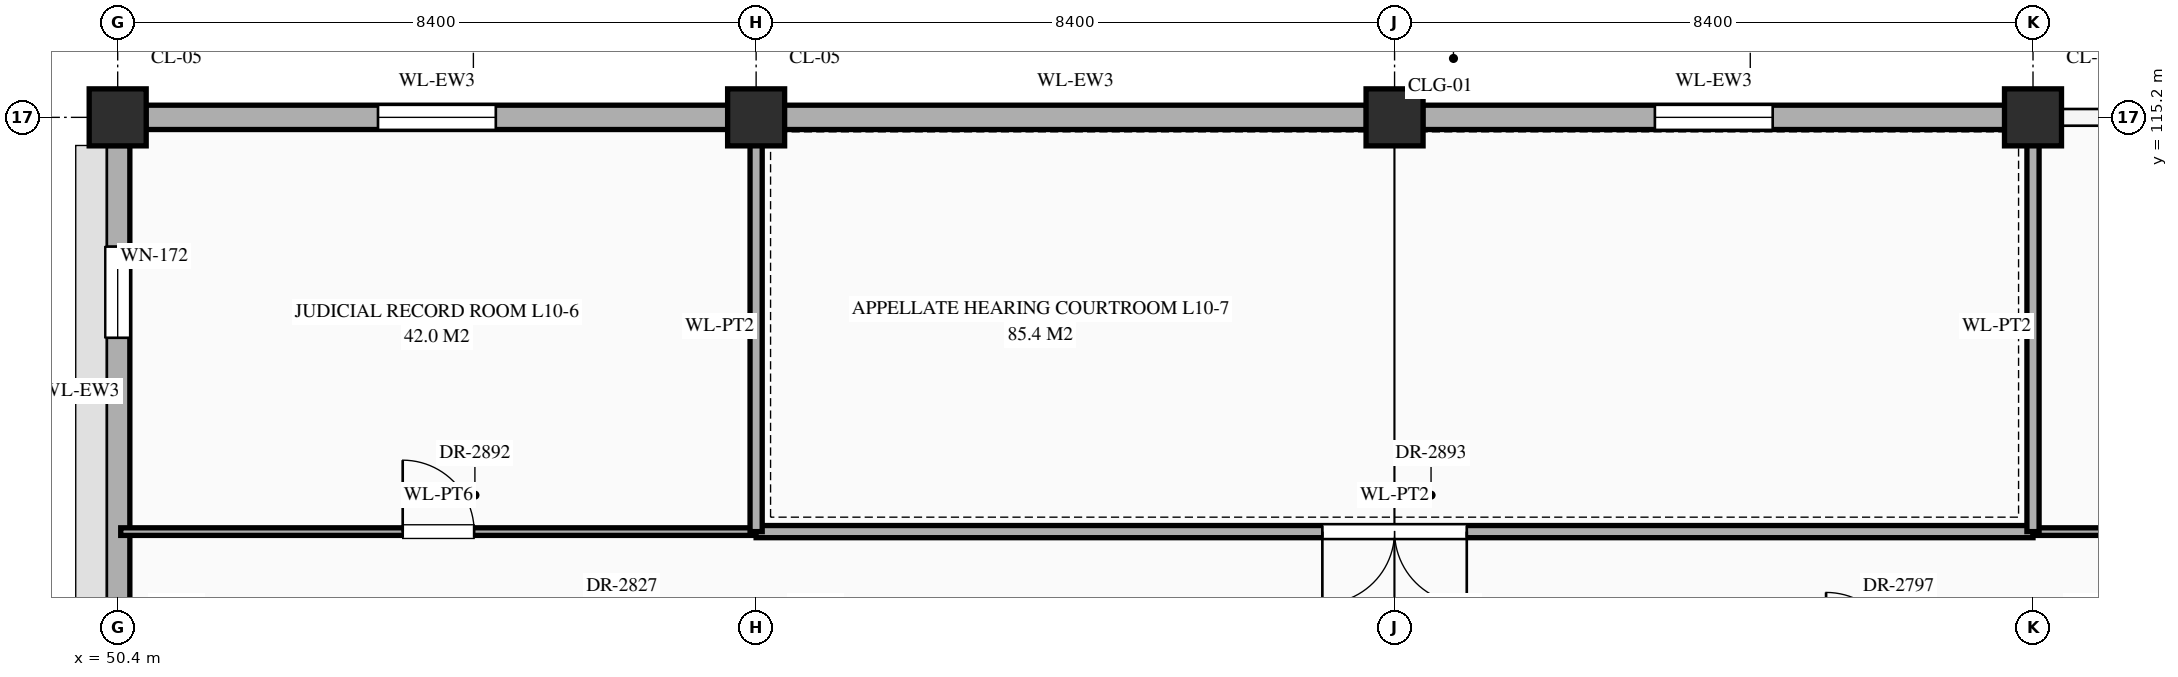
"""IFC4 building model, lengths in metres.
Left out: names, types, materials, properties, quantities, classifications, styles, units other than length and angle.
Written with IfcOpenShell. Run it as: python <this file> out.ifc"""

import sys

from ifc_helpers import new_model, si_unit, direction, frame, frame_2d, origin, origin_2d, place, context, subcontext, project, spatial, rectangle, extrude, element, fill, save


model = new_model("IFC4")
c1 = context("Model", 3, precision=1e-05, world=origin(), true_north=direction((0.0, 1.0)))
c2 = subcontext(c1, "Body", "Model", "MODEL_VIEW")
j1 = project(units=[si_unit("LENGTHUNIT", "METRE"), si_unit("PLANEANGLEUNIT", "RADIAN")], contexts=[c1])
p1 = place(None, origin())
s1 = spatial("IfcSite", under=j1, at=p1, CompositionType="ELEMENT")
p2 = place(p1, origin())
s2 = spatial("IfcBuilding", under=s1, at=p2, CompositionType="ELEMENT")
p3 = place(p2, frame((0.0, 0.0, 43.5)))
s3 = spatial("IfcBuildingStorey", under=s2, at=p3, CompositionType="ELEMENT", Elevation=43.5)
for number, where, z_axis, x_axis in (
    (1, (50.4, 115.2, 0.0), (0.0, 0.0, 1.0), (1.0, 0.0, 0.0)),
    (2, (58.8, 115.2, 0.0), (0.0, 0.0, 1.0), (1.0, 0.0, 0.0)),
    (3, (67.2, 115.2, 0.0), (0.0, 0.0, 1.0), (1.0, 0.0, 0.0)),
    (4, (75.6, 115.2, 0.0), (0.0, 0.0, 1.0), (1.0, 0.0, 0.0)),
):
    element("IfcColumn", number, at=place(p3, frame(where, z_axis=z_axis, x_axis=x_axis)), inside=s3, PredefinedType="COLUMN", context=c2, shape_type="SweptSolid", body=[
        extrude(rectangle(XDim=0.75, YDim=0.75, at=origin_2d()), origin(), (0.0, 0.0, 1.0), 4.2),
    ])
p4 = place(p3, frame((50.77, 115.2, 0.0), z_axis=(0.0, 0.0, 1.0), x_axis=(1.0, 0.0, 0.0)))
e5 = element("IfcWall", 5, at=p4, inside=s3, PredefinedType="STANDARD", context=c2, shape_type="SweptSolid", body=[
    extrude(rectangle(XDim=7.66, YDim=0.32, at=frame_2d((3.83, 0.0))), origin(), (0.0, 0.0, 1.0), 3.35),
])
p5 = place(p4, frame((3.055, 0.0, 0.85)))
e6 = element("IfcOpeningElement", 6, at=p5, cuts=e5, PredefinedType="OPENING", context=c2, shape_type="SweptSolid", body=[
    extrude(rectangle(XDim=1.55, YDim=1.74, at=frame_2d((0.775, 0.87))), frame((0.0, 0.172, 0.0), z_axis=(0.0, -1.0, 0.0), x_axis=(1.0, 0.0, 0.0)), (0.0, 0.0, 1.0), 0.344),
])
p6 = place(p3, frame((50.4, 108.37, 0.0), z_axis=(0.0, 0.0, 1.0), x_axis=(0.0, 1.0, 0.0)))
e7 = element("IfcWall", 7, at=p6, inside=s3, PredefinedType="STANDARD", context=c2, shape_type="SweptSolid", body=[
    extrude(rectangle(XDim=6.46, YDim=0.32, at=frame_2d((3.23, 0.0))), origin(), (0.0, 0.0, 1.0), 3.35),
])
p7 = place(p6, frame((3.93, 0.0, 0.85)))
e8 = element("IfcOpeningElement", 8, at=p7, cuts=e7, PredefinedType="OPENING", context=c2, shape_type="SweptSolid", body=[
    extrude(rectangle(XDim=1.2, YDim=1.74, at=frame_2d((0.6, 0.87))), frame((0.0, 0.172, 0.0), z_axis=(0.0, -1.0, 0.0), x_axis=(1.0, 0.0, 0.0)), (0.0, 0.0, 1.0), 0.344),
])
p8 = place(p3, frame((59.17, 115.2, 0.0), z_axis=(0.0, 0.0, 1.0), x_axis=(1.0, 0.0, 0.0)))
e9 = element("IfcWall", 9, at=p8, inside=s3, PredefinedType="STANDARD", context=c2, shape_type="SweptSolid", body=[
    extrude(rectangle(XDim=7.66, YDim=0.32, at=frame_2d((3.83, 0.0))), origin(), (0.0, 0.0, 1.0), 3.35),
])
p9 = place(p3, frame((67.57, 115.2, 0.0), z_axis=(0.0, 0.0, 1.0), x_axis=(1.0, 0.0, 0.0)))
e10 = element("IfcWall", 10, at=p9, inside=s3, PredefinedType="STANDARD", context=c2, shape_type="SweptSolid", body=[
    extrude(rectangle(XDim=7.66, YDim=0.32, at=frame_2d((3.83, 0.0))), origin(), (0.0, 0.0, 1.0), 3.35),
])
p10 = place(p9, frame((3.055, 0.0, 0.85)))
e11 = element("IfcOpeningElement", 11, at=p10, cuts=e10, PredefinedType="OPENING", context=c2, shape_type="SweptSolid", body=[
    extrude(rectangle(XDim=1.55, YDim=2.12, at=frame_2d((0.775, 1.06))), frame((0.0, 0.172, 0.0), z_axis=(0.0, -1.0, 0.0), x_axis=(1.0, 0.0, 0.0)), (0.0, 0.0, 1.0), 0.344),
])
p11 = place(p3, frame((50.44, 109.75, 0.0), z_axis=(0.0, 0.0, 1.0), x_axis=(1.0, 0.0, 0.0)))
e12 = element("IfcWall", 12, at=p11, inside=s3, PredefinedType="STANDARD", context=c2, shape_type="SweptSolid", body=[
    extrude(rectangle(XDim=8.36, YDim=0.1, at=frame_2d((4.18, 0.0))), origin(), (0.0, 0.0, 1.0), 4.0),
])
p12 = place(p11, frame((3.71, 0.0, 0.0)))
e13 = element("IfcOpeningElement", 13, at=p12, cuts=e12, PredefinedType="OPENING", context=c2, shape_type="SweptSolid", body=[
    extrude(rectangle(XDim=0.94, YDim=2.3, at=frame_2d((0.47, 1.15))), frame((0.0, 0.062, 0.0), z_axis=(0.0, -1.0, 0.0), x_axis=(1.0, 0.0, 0.0)), (0.0, 0.0, 1.0), 0.124),
])
p13 = place(p3, frame((58.8, 109.75, 0.0), z_axis=(0.0, 0.0, 1.0), x_axis=(1.0, 0.0, 0.0)))
e14 = element("IfcWall", 14, at=p13, inside=s3, PredefinedType="STANDARD", context=c2, shape_type="SweptSolid", body=[
    extrude(rectangle(XDim=16.8, YDim=0.16, at=frame_2d((8.4, 0.0))), origin(), (0.0, 0.0, 1.0), 4.0),
])
p14 = place(p13, frame((7.45, 0.0, 0.0)))
e15 = element("IfcOpeningElement", 15, at=p14, cuts=e14, PredefinedType="OPENING", context=c2, shape_type="SweptSolid", body=[
    extrude(rectangle(XDim=1.9, YDim=2.5, at=frame_2d((0.95, 1.25))), frame((0.0, 0.092, 0.0), z_axis=(0.0, -1.0, 0.0), x_axis=(1.0, 0.0, 0.0)), (0.0, 0.0, 1.0), 0.184),
])
p15 = place(p3, frame((75.6, 109.75, 0.0), z_axis=(0.0, 0.0, 1.0), x_axis=(1.0, 0.0, 0.0)))
e16 = element("IfcWall", 16, at=p15, inside=s3, PredefinedType="STANDARD", context=c2, shape_type="SweptSolid", body=[
    extrude(rectangle(XDim=16.8, YDim=0.1, at=frame_2d((8.4, 0.0))), origin(), (0.0, 0.0, 1.0), 4.0),
])
p16 = place(p15, frame((3.69, 0.0, 0.0)))
e17 = element("IfcOpeningElement", 17, at=p16, cuts=e16, PredefinedType="OPENING", context=c2, shape_type="SweptSolid", body=[
    extrude(rectangle(XDim=1.02, YDim=2.4, at=frame_2d((0.51, 1.2))), frame((0.0, 0.062, 0.0), z_axis=(0.0, -1.0, 0.0), x_axis=(1.0, 0.0, 0.0)), (0.0, 0.0, 1.0), 0.124),
])
p17 = place(p15, frame((12.07, 0.0, 0.0)))
e18 = element("IfcOpeningElement", 18, at=p17, cuts=e16, PredefinedType="OPENING", context=c2, shape_type="SweptSolid", body=[
    extrude(rectangle(XDim=1.06, YDim=2.4, at=frame_2d((0.53, 1.2))), frame((0.0, 0.062, 0.0), z_axis=(0.0, -1.0, 0.0), x_axis=(1.0, 0.0, 0.0)), (0.0, 0.0, 1.0), 0.124),
])
for number, where, z_axis, x_axis in (
    (19, (58.8, 109.75, 0.0), (0.0, 0.0, 1.0), (0.0, 1.0, 0.0)),
    (20, (75.6, 109.75, 0.0), (0.0, 0.0, 1.0), (0.0, 1.0, 0.0)),
):
    element("IfcWall", number, at=place(p3, frame(where, z_axis=z_axis, x_axis=x_axis)), inside=s3, PredefinedType="STANDARD", context=c2, shape_type="SweptSolid", body=[
        extrude(rectangle(XDim=5.41, YDim=0.16, at=frame_2d((2.705, 0.0))), origin(), (0.0, 0.0, 1.0), 3.25),
    ])
p18 = place(p5, origin())
e21 = element("IfcWindow", 21, at=p18, inside=s3, PartitioningType="SINGLE_PANEL", PredefinedType="WINDOW", context=c2, shape_type="SweptSolid", body=[
    extrude(rectangle(XDim=1.55, YDim=1.74, at=frame_2d((0.775, 0.87))), frame((0.0, 0.03, 0.0), z_axis=(0.0, -1.0, 0.0), x_axis=(1.0, 0.0, 0.0)), (0.0, 0.0, 1.0), 0.06),
])
fill(e6, e21)
p19 = place(p7, origin())
e22 = element("IfcWindow", 22, at=p19, inside=s3, PartitioningType="SINGLE_PANEL", PredefinedType="WINDOW", context=c2, shape_type="SweptSolid", body=[
    extrude(rectangle(XDim=1.2, YDim=1.74, at=frame_2d((0.6, 0.87))), frame((0.0, 0.03, 0.0), z_axis=(0.0, -1.0, 0.0), x_axis=(1.0, 0.0, 0.0)), (0.0, 0.0, 1.0), 0.06),
])
fill(e8, e22)
p20 = place(p10, origin())
e23 = element("IfcWindow", 23, at=p20, inside=s3, PartitioningType="SINGLE_PANEL", PredefinedType="WINDOW", context=c2, shape_type="SweptSolid", body=[
    extrude(rectangle(XDim=1.55, YDim=2.12, at=frame_2d((0.775, 1.06))), frame((0.0, 0.03, 0.0), z_axis=(0.0, -1.0, 0.0), x_axis=(1.0, 0.0, 0.0)), (0.0, 0.0, 1.0), 0.06),
])
fill(e11, e23)
p21 = place(p12, origin())
e24 = element("IfcDoor", 24, at=p21, inside=s3, OperationType="SINGLE_SWING_LEFT", PredefinedType="DOOR", context=c2, shape_type="SweptSolid", body=[
    extrude(rectangle(XDim=0.94, YDim=2.3, at=frame_2d((0.47, 1.15))), frame((0.0, 0.025, 0.0), z_axis=(0.0, -1.0, 0.0), x_axis=(1.0, 0.0, 0.0)), (0.0, 0.0, 1.0), 0.05),
])
fill(e13, e24)
p22 = place(p14, frame((1.9, 0.0, 0.0), z_axis=(0.0, 0.0, 1.0), x_axis=(-1.0, 0.0, 0.0)))
e25 = element("IfcDoor", 25, at=p22, inside=s3, OperationType="DOUBLE_DOOR_SINGLE_SWING", PredefinedType="DOOR", context=c2, shape_type="SweptSolid", body=[
    extrude(rectangle(XDim=1.9, YDim=2.5, at=frame_2d((0.95, 1.25))), frame((0.0, 0.025, 0.0), z_axis=(0.0, -1.0, 0.0), x_axis=(1.0, 0.0, 0.0)), (0.0, 0.0, 1.0), 0.05),
])
fill(e15, e25)
save(model, sys.argv[1])
